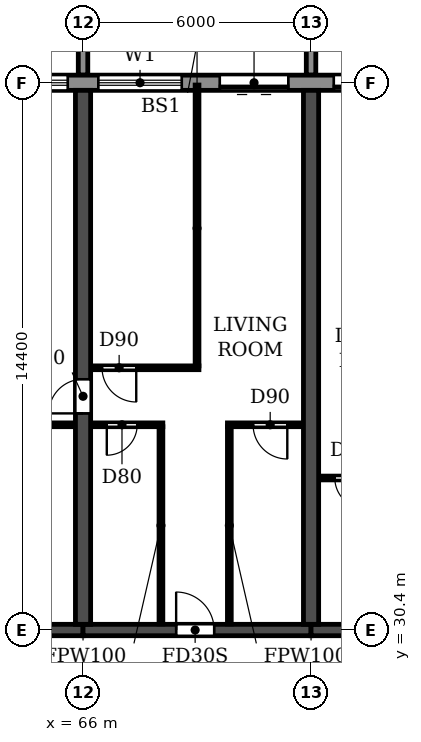
"""IFC4 building model, lengths in metres.
Left out: names, types, materials, properties, quantities, classifications, styles, units other than length and angle.
Written with IfcOpenShell. Run it as: python <this file> out.ifc"""

import sys

from ifc_helpers import new_model, si_unit, direction, frame, frame_2d, origin, place, context, subcontext, project, spatial, polyline, rectangle, outline, extrude, source, transform, mapped, element, fill, save


model = new_model("IFC4")
c1 = context("Model", 3, precision=1e-05, world=origin(), true_north=direction((0.0, 1.0)))
c2 = subcontext(c1, "Body", "Model", "MODEL_VIEW")
j1 = project(units=[si_unit("LENGTHUNIT", "METRE"), si_unit("PLANEANGLEUNIT", "RADIAN")], contexts=[c1])
p1 = place(None, origin())
s1 = spatial("IfcSite", under=j1, at=p1, CompositionType="ELEMENT")
p2 = place(p1, origin())
s2 = spatial("IfcBuilding", under=s1, at=p2, CompositionType="ELEMENT")
p3 = place(p2, frame((0.0, 0.0, 49.8)))
s3 = spatial("IfcBuildingStorey", under=s2, at=p3, CompositionType="ELEMENT", Elevation=49.8)
p4 = place(p3, frame((66.0, 30.55, 0.0), z_axis=(0.0, 0.0, 1.0), x_axis=(0.0, 1.0, 0.0)))
e1 = element("IfcWall", 1, at=p4, inside=s3, PredefinedType="SHEAR", context=c2, shape_type="SweptSolid", body=[
    extrude(rectangle(XDim=14.05, YDim=0.4, at=frame_2d((7.025, 0.0))), origin(), (0.0, 0.0, 1.0), 3.0),
])
p5 = place(p4, frame((5.55, 0.0, 0.0)))
e2 = element("IfcOpeningElement", 2, at=p5, cuts=e1, PredefinedType="OPENING", context=c2, shape_type="SweptSolid", body=[
    extrude(rectangle(XDim=0.9, YDim=2.1, at=frame_2d((0.45, 1.05))), frame((0.0, 0.21, 0.0), z_axis=(0.0, -1.0, 0.0), x_axis=(1.0, 0.0, 0.0)), (0.0, 0.0, 1.0), 0.42),
])
p6 = place(p3, frame((72.0, 30.55, 0.0), z_axis=(0.0, 0.0, 1.0), x_axis=(0.0, 1.0, 0.0)))
e3 = element("IfcWall", 3, at=p6, inside=s3, PredefinedType="SHEAR", context=c2, shape_type="SweptSolid", body=[
    extrude(rectangle(XDim=14.05, YDim=0.4, at=frame_2d((7.025, 0.0))), origin(), (0.0, 0.0, 1.0), 3.0),
])
p7 = place(p3, frame((60.0, 30.4, 0.0), z_axis=(0.0, 0.0, 1.0), x_axis=(1.0, 0.0, 0.0)))
e4 = element("IfcWall", 4, at=p7, inside=s3, PredefinedType="SHEAR", context=c2, shape_type="SweptSolid", body=[
    extrude(rectangle(XDim=6.0, YDim=0.3, at=frame_2d((3.0, 0.0))), origin(), (0.0, 0.0, 1.0), 2.4),
])
p8 = place(p3, frame((66.0, 30.4, 0.0), z_axis=(0.0, 0.0, 1.0), x_axis=(1.0, 0.0, 0.0)))
e5 = element("IfcWall", 5, at=p8, inside=s3, PredefinedType="SHEAR", context=c2, shape_type="SweptSolid", body=[
    extrude(rectangle(XDim=6.0, YDim=0.3, at=frame_2d((3.0, 0.0))), origin(), (0.0, 0.0, 1.0), 2.4),
])
p9 = place(p8, frame((2.45, 0.0, 0.0)))
e6 = element("IfcOpeningElement", 6, at=p9, cuts=e5, PredefinedType="OPENING", context=c2, shape_type="SweptSolid", body=[
    extrude(rectangle(XDim=1.0, YDim=2.1, at=frame_2d((0.5, 1.05))), frame((0.0, 0.16, 0.0), z_axis=(0.0, -1.0, 0.0), x_axis=(1.0, 0.0, 0.0)), (0.0, 0.0, 1.0), 0.32),
])
p10 = place(p3, frame((72.0, 30.4, 0.0), z_axis=(0.0, 0.0, 1.0), x_axis=(1.0, 0.0, 0.0)))
e7 = element("IfcWall", 7, at=p10, inside=s3, PredefinedType="SHEAR", context=c2, shape_type="SweptSolid", body=[
    extrude(rectangle(XDim=6.0, YDim=0.3, at=frame_2d((3.0, 0.0))), origin(), (0.0, 0.0, 1.0), 2.4),
])
p11 = place(p10, frame((2.45, 0.0, 0.0)))
e8 = element("IfcOpeningElement", 8, at=p11, cuts=e7, PredefinedType="OPENING", context=c2, shape_type="SweptSolid", body=[
    extrude(rectangle(XDim=1.0, YDim=2.1, at=frame_2d((0.5, 1.05))), frame((0.0, 0.16, 0.0), z_axis=(0.0, -1.0, 0.0), x_axis=(1.0, 0.0, 0.0)), (0.0, 0.0, 1.0), 0.32),
])
p12 = place(p3, frame((97.317, 44.8, 0.0), z_axis=(0.0, 0.0, 1.0), x_axis=(-1.0, 0.0, 0.0)))
e9 = element("IfcWall", 9, at=p12, inside=s3, PredefinedType="STANDARD", context=c2, shape_type="SweptSolid", body=[
    extrude(rectangle(XDim=92.634, YDim=0.4, at=frame_2d((46.317, 0.0))), origin(), (0.0, 0.0, 1.0), 3.0),
])
p13 = place(p12, frame((88.917, 0.0, 0.0)))
e10 = element("IfcOpeningElement", 10, at=p13, cuts=e9, PredefinedType="OPENING", context=c2, shape_type="SweptSolid", body=[
    extrude(rectangle(XDim=1.8, YDim=2.4, at=frame_2d((0.9, 1.2))), frame((0.0, 0.21, 0.0), z_axis=(0.0, -1.0, 0.0), x_axis=(1.0, 0.0, 0.0)), (0.0, 0.0, 1.0), 0.42),
])
p14 = place(p12, frame((85.717, 0.0, 0.9)))
e11 = element("IfcOpeningElement", 11, at=p14, cuts=e9, PredefinedType="OPENING", context=c2, shape_type="SweptSolid", body=[
    extrude(rectangle(XDim=2.2, YDim=1.5, at=frame_2d((1.1, 0.75))), frame((0.0, 0.21, 0.0), z_axis=(0.0, -1.0, 0.0), x_axis=(1.0, 0.0, 0.0)), (0.0, 0.0, 1.0), 0.42),
])
p15 = place(p12, frame((82.717, 0.0, 0.9)))
e12 = element("IfcOpeningElement", 12, at=p15, cuts=e9, PredefinedType="OPENING", context=c2, shape_type="SweptSolid", body=[
    extrude(rectangle(XDim=2.2, YDim=1.5, at=frame_2d((1.1, 0.75))), frame((0.0, 0.21, 0.0), z_axis=(0.0, -1.0, 0.0), x_axis=(1.0, 0.0, 0.0)), (0.0, 0.0, 1.0), 0.42),
])
p16 = place(p12, frame((79.717, 0.0, 0.9)))
e13 = element("IfcOpeningElement", 13, at=p16, cuts=e9, PredefinedType="OPENING", context=c2, shape_type="SweptSolid", body=[
    extrude(rectangle(XDim=2.2, YDim=1.5, at=frame_2d((1.1, 0.75))), frame((0.0, 0.21, 0.0), z_axis=(0.0, -1.0, 0.0), x_axis=(1.0, 0.0, 0.0)), (0.0, 0.0, 1.0), 0.42),
])
p17 = place(p12, frame((76.717, 0.0, 0.9)))
e14 = element("IfcOpeningElement", 14, at=p17, cuts=e9, PredefinedType="OPENING", context=c2, shape_type="SweptSolid", body=[
    extrude(rectangle(XDim=2.2, YDim=1.5, at=frame_2d((1.1, 0.75))), frame((0.0, 0.21, 0.0), z_axis=(0.0, -1.0, 0.0), x_axis=(1.0, 0.0, 0.0)), (0.0, 0.0, 1.0), 0.42),
])
p18 = place(p12, frame((73.917, 0.0, 0.0)))
e15 = element("IfcOpeningElement", 15, at=p18, cuts=e9, PredefinedType="OPENING", context=c2, shape_type="SweptSolid", body=[
    extrude(rectangle(XDim=1.8, YDim=2.4, at=frame_2d((0.9, 1.2))), frame((0.0, 0.21, 0.0), z_axis=(0.0, -1.0, 0.0), x_axis=(1.0, 0.0, 0.0)), (0.0, 0.0, 1.0), 0.42),
])
p19 = place(p12, frame((70.717, 0.0, 0.9)))
e16 = element("IfcOpeningElement", 16, at=p19, cuts=e9, PredefinedType="OPENING", context=c2, shape_type="SweptSolid", body=[
    extrude(rectangle(XDim=2.2, YDim=1.5, at=frame_2d((1.1, 0.75))), frame((0.0, 0.21, 0.0), z_axis=(0.0, -1.0, 0.0), x_axis=(1.0, 0.0, 0.0)), (0.0, 0.0, 1.0), 0.42),
])
p20 = place(p12, frame((67.717, 0.0, 0.9)))
e17 = element("IfcOpeningElement", 17, at=p20, cuts=e9, PredefinedType="OPENING", context=c2, shape_type="SweptSolid", body=[
    extrude(rectangle(XDim=2.2, YDim=1.5, at=frame_2d((1.1, 0.75))), frame((0.0, 0.21, 0.0), z_axis=(0.0, -1.0, 0.0), x_axis=(1.0, 0.0, 0.0)), (0.0, 0.0, 1.0), 0.42),
])
p21 = place(p12, frame((64.717, 0.0, 0.9)))
e18 = element("IfcOpeningElement", 18, at=p21, cuts=e9, PredefinedType="OPENING", context=c2, shape_type="SweptSolid", body=[
    extrude(rectangle(XDim=2.2, YDim=1.5, at=frame_2d((1.1, 0.75))), frame((0.0, 0.21, 0.0), z_axis=(0.0, -1.0, 0.0), x_axis=(1.0, 0.0, 0.0)), (0.0, 0.0, 1.0), 0.42),
])
p22 = place(p12, frame((61.917, 0.0, 0.0)))
e19 = element("IfcOpeningElement", 19, at=p22, cuts=e9, PredefinedType="OPENING", context=c2, shape_type="SweptSolid", body=[
    extrude(rectangle(XDim=1.8, YDim=2.4, at=frame_2d((0.9, 1.2))), frame((0.0, 0.21, 0.0), z_axis=(0.0, -1.0, 0.0), x_axis=(1.0, 0.0, 0.0)), (0.0, 0.0, 1.0), 0.42),
])
p23 = place(p12, frame((58.717, 0.0, 0.9)))
e20 = element("IfcOpeningElement", 20, at=p23, cuts=e9, PredefinedType="OPENING", context=c2, shape_type="SweptSolid", body=[
    extrude(rectangle(XDim=2.2, YDim=1.5, at=frame_2d((1.1, 0.75))), frame((0.0, 0.21, 0.0), z_axis=(0.0, -1.0, 0.0), x_axis=(1.0, 0.0, 0.0)), (0.0, 0.0, 1.0), 0.42),
])
p24 = place(p12, frame((55.717, 0.0, 0.9)))
e21 = element("IfcOpeningElement", 21, at=p24, cuts=e9, PredefinedType="OPENING", context=c2, shape_type="SweptSolid", body=[
    extrude(rectangle(XDim=2.2, YDim=1.5, at=frame_2d((1.1, 0.75))), frame((0.0, 0.21, 0.0), z_axis=(0.0, -1.0, 0.0), x_axis=(1.0, 0.0, 0.0)), (0.0, 0.0, 1.0), 0.42),
])
p25 = place(p12, frame((52.717, 0.0, 0.9)))
e22 = element("IfcOpeningElement", 22, at=p25, cuts=e9, PredefinedType="OPENING", context=c2, shape_type="SweptSolid", body=[
    extrude(rectangle(XDim=2.2, YDim=1.5, at=frame_2d((1.1, 0.75))), frame((0.0, 0.21, 0.0), z_axis=(0.0, -1.0, 0.0), x_axis=(1.0, 0.0, 0.0)), (0.0, 0.0, 1.0), 0.42),
])
p26 = place(p12, frame((49.917, 0.0, 0.0)))
e23 = element("IfcOpeningElement", 23, at=p26, cuts=e9, PredefinedType="OPENING", context=c2, shape_type="SweptSolid", body=[
    extrude(rectangle(XDim=1.8, YDim=2.4, at=frame_2d((0.9, 1.2))), frame((0.0, 0.21, 0.0), z_axis=(0.0, -1.0, 0.0), x_axis=(1.0, 0.0, 0.0)), (0.0, 0.0, 1.0), 0.42),
])
p27 = place(p12, frame((46.717, 0.0, 0.9)))
e24 = element("IfcOpeningElement", 24, at=p27, cuts=e9, PredefinedType="OPENING", context=c2, shape_type="SweptSolid", body=[
    extrude(rectangle(XDim=2.2, YDim=1.5, at=frame_2d((1.1, 0.75))), frame((0.0, 0.21, 0.0), z_axis=(0.0, -1.0, 0.0), x_axis=(1.0, 0.0, 0.0)), (0.0, 0.0, 1.0), 0.42),
])
p28 = place(p12, frame((43.717, 0.0, 0.9)))
e25 = element("IfcOpeningElement", 25, at=p28, cuts=e9, PredefinedType="OPENING", context=c2, shape_type="SweptSolid", body=[
    extrude(rectangle(XDim=2.2, YDim=1.5, at=frame_2d((1.1, 0.75))), frame((0.0, 0.21, 0.0), z_axis=(0.0, -1.0, 0.0), x_axis=(1.0, 0.0, 0.0)), (0.0, 0.0, 1.0), 0.42),
])
p29 = place(p12, frame((40.717, 0.0, 0.9)))
e26 = element("IfcOpeningElement", 26, at=p29, cuts=e9, PredefinedType="OPENING", context=c2, shape_type="SweptSolid", body=[
    extrude(rectangle(XDim=2.2, YDim=1.5, at=frame_2d((1.1, 0.75))), frame((0.0, 0.21, 0.0), z_axis=(0.0, -1.0, 0.0), x_axis=(1.0, 0.0, 0.0)), (0.0, 0.0, 1.0), 0.42),
])
p30 = place(p12, frame((37.917, 0.0, 0.0)))
e27 = element("IfcOpeningElement", 27, at=p30, cuts=e9, PredefinedType="OPENING", context=c2, shape_type="SweptSolid", body=[
    extrude(rectangle(XDim=1.8, YDim=2.4, at=frame_2d((0.9, 1.2))), frame((0.0, 0.21, 0.0), z_axis=(0.0, -1.0, 0.0), x_axis=(1.0, 0.0, 0.0)), (0.0, 0.0, 1.0), 0.42),
])
p31 = place(p12, frame((34.717, 0.0, 0.9)))
e28 = element("IfcOpeningElement", 28, at=p31, cuts=e9, PredefinedType="OPENING", context=c2, shape_type="SweptSolid", body=[
    extrude(rectangle(XDim=2.2, YDim=1.5, at=frame_2d((1.1, 0.75))), frame((0.0, 0.21, 0.0), z_axis=(0.0, -1.0, 0.0), x_axis=(1.0, 0.0, 0.0)), (0.0, 0.0, 1.0), 0.42),
])
p32 = place(p12, frame((31.717, 0.0, 0.9)))
e29 = element("IfcOpeningElement", 29, at=p32, cuts=e9, PredefinedType="OPENING", context=c2, shape_type="SweptSolid", body=[
    extrude(rectangle(XDim=2.2, YDim=1.5, at=frame_2d((1.1, 0.75))), frame((0.0, 0.21, 0.0), z_axis=(0.0, -1.0, 0.0), x_axis=(1.0, 0.0, 0.0)), (0.0, 0.0, 1.0), 0.42),
])
p33 = place(p12, frame((28.717, 0.0, 0.9)))
e30 = element("IfcOpeningElement", 30, at=p33, cuts=e9, PredefinedType="OPENING", context=c2, shape_type="SweptSolid", body=[
    extrude(rectangle(XDim=2.2, YDim=1.5, at=frame_2d((1.1, 0.75))), frame((0.0, 0.21, 0.0), z_axis=(0.0, -1.0, 0.0), x_axis=(1.0, 0.0, 0.0)), (0.0, 0.0, 1.0), 0.42),
])
p34 = place(p12, frame((25.917, 0.0, 0.0)))
e31 = element("IfcOpeningElement", 31, at=p34, cuts=e9, PredefinedType="OPENING", context=c2, shape_type="SweptSolid", body=[
    extrude(rectangle(XDim=1.8, YDim=2.4, at=frame_2d((0.9, 1.2))), frame((0.0, 0.21, 0.0), z_axis=(0.0, -1.0, 0.0), x_axis=(1.0, 0.0, 0.0)), (0.0, 0.0, 1.0), 0.42),
])
p35 = place(p12, frame((22.917, 0.0, 0.0)))
e32 = element("IfcOpeningElement", 32, at=p35, cuts=e9, PredefinedType="OPENING", context=c2, shape_type="SweptSolid", body=[
    extrude(rectangle(XDim=1.8, YDim=2.4, at=frame_2d((0.9, 1.2))), frame((0.0, 0.21, 0.0), z_axis=(0.0, -1.0, 0.0), x_axis=(1.0, 0.0, 0.0)), (0.0, 0.0, 1.0), 0.42),
])
p36 = place(p12, frame((19.717, 0.0, 0.9)))
e33 = element("IfcOpeningElement", 33, at=p36, cuts=e9, PredefinedType="OPENING", context=c2, shape_type="SweptSolid", body=[
    extrude(rectangle(XDim=2.2, YDim=1.5, at=frame_2d((1.1, 0.75))), frame((0.0, 0.21, 0.0), z_axis=(0.0, -1.0, 0.0), x_axis=(1.0, 0.0, 0.0)), (0.0, 0.0, 1.0), 0.42),
])
p37 = place(p12, frame((16.717, 0.0, 0.9)))
e34 = element("IfcOpeningElement", 34, at=p37, cuts=e9, PredefinedType="OPENING", context=c2, shape_type="SweptSolid", body=[
    extrude(rectangle(XDim=2.2, YDim=1.5, at=frame_2d((1.1, 0.75))), frame((0.0, 0.21, 0.0), z_axis=(0.0, -1.0, 0.0), x_axis=(1.0, 0.0, 0.0)), (0.0, 0.0, 1.0), 0.42),
])
p38 = place(p12, frame((13.717, 0.0, 0.9)))
e35 = element("IfcOpeningElement", 35, at=p38, cuts=e9, PredefinedType="OPENING", context=c2, shape_type="SweptSolid", body=[
    extrude(rectangle(XDim=2.2, YDim=1.5, at=frame_2d((1.1, 0.75))), frame((0.0, 0.21, 0.0), z_axis=(0.0, -1.0, 0.0), x_axis=(1.0, 0.0, 0.0)), (0.0, 0.0, 1.0), 0.42),
])
p39 = place(p12, frame((10.717, 0.0, 0.9)))
e36 = element("IfcOpeningElement", 36, at=p39, cuts=e9, PredefinedType="OPENING", context=c2, shape_type="SweptSolid", body=[
    extrude(rectangle(XDim=2.2, YDim=1.5, at=frame_2d((1.1, 0.75))), frame((0.0, 0.21, 0.0), z_axis=(0.0, -1.0, 0.0), x_axis=(1.0, 0.0, 0.0)), (0.0, 0.0, 1.0), 0.42),
])
p40 = place(p12, frame((7.917, 0.0, 0.0)))
e37 = element("IfcOpeningElement", 37, at=p40, cuts=e9, PredefinedType="OPENING", context=c2, shape_type="SweptSolid", body=[
    extrude(rectangle(XDim=1.8, YDim=2.4, at=frame_2d((0.9, 1.2))), frame((0.0, 0.21, 0.0), z_axis=(0.0, -1.0, 0.0), x_axis=(1.0, 0.0, 0.0)), (0.0, 0.0, 1.0), 0.42),
])
p41 = place(p12, frame((4.717, 0.0, 0.9)))
e38 = element("IfcOpeningElement", 38, at=p41, cuts=e9, PredefinedType="OPENING", context=c2, shape_type="SweptSolid", body=[
    extrude(rectangle(XDim=2.2, YDim=1.5, at=frame_2d((1.1, 0.75))), frame((0.0, 0.21, 0.0), z_axis=(0.0, -1.0, 0.0), x_axis=(1.0, 0.0, 0.0)), (0.0, 0.0, 1.0), 0.42),
])
p42 = place(p12, frame((1.917, 0.0, 0.0)))
e39 = element("IfcOpeningElement", 39, at=p42, cuts=e9, PredefinedType="OPENING", context=c2, shape_type="SweptSolid", body=[
    extrude(rectangle(XDim=1.8, YDim=2.4, at=frame_2d((0.9, 1.2))), frame((0.0, 0.21, 0.0), z_axis=(0.0, -1.0, 0.0), x_axis=(1.0, 0.0, 0.0)), (0.0, 0.0, 1.0), 0.42),
])
m1 = source(origin(), c2, "Body", "SweptSolid", [
    extrude(outline(polyline([(0.0, 0.0), (0.25, 0.0), (0.25, 3.1), (0.0, 3.1), (0.0, 0.0)])), origin(), (0.0, 0.0, 1.0), 3.1),
])
for number, where in (
    (40, (65.875, 45.0, 0.0)),
    (41, (71.875, 45.0, 0.0)),
):
    element("IfcWall", number, at=place(p3, frame(where)), inside=s3, PredefinedType="STANDARD", context=c2, shape_type="MappedRepresentation", body=[
        mapped(m1, transform((0.0, 0.0, 0.0))),
    ])
p43 = place(p3, frame((72.21, 34.4, 0.0), z_axis=(0.0, 0.0, 1.0), x_axis=(1.0, 0.0, 0.0)))
e42 = element("IfcWall", 42, at=p43, inside=s3, PredefinedType="PARTITIONING", context=c2, shape_type="SweptSolid", body=[
    extrude(rectangle(XDim=1.89, YDim=0.1, at=frame_2d((0.945, 0.0))), origin(), (0.0, 0.0, 1.0), 3.0),
])
p44 = place(p43, frame((0.415, 0.0, 0.0)))
e43 = element("IfcOpeningElement", 43, at=p44, cuts=e42, PredefinedType="OPENING", context=c2, shape_type="SweptSolid", body=[
    extrude(rectangle(XDim=0.8, YDim=2.1, at=frame_2d((0.4, 1.05))), frame((0.0, 0.06, 0.0), z_axis=(0.0, -1.0, 0.0), x_axis=(1.0, 0.0, 0.0)), (0.0, 0.0, 1.0), 0.12),
])
p45 = place(p3, frame((62.9, 35.8, 0.0), z_axis=(0.0, 0.0, 1.0), x_axis=(1.0, 0.0, 0.0)))
e44 = element("IfcWall", 44, at=p45, inside=s3, PredefinedType="PARTITIONING", context=c2, shape_type="SweptSolid", body=[
    extrude(rectangle(XDim=2.89, YDim=0.1, at=frame_2d((1.445, 0.0))), origin(), (0.0, 0.0, 1.0), 3.0),
])
p46 = place(p45, frame((1.2, 0.0, 0.0)))
e45 = element("IfcOpeningElement", 45, at=p46, cuts=e44, PredefinedType="OPENING", context=c2, shape_type="SweptSolid", body=[
    extrude(rectangle(XDim=0.8, YDim=2.1, at=frame_2d((0.4, 1.05))), frame((0.0, 0.06, 0.0), z_axis=(0.0, -1.0, 0.0), x_axis=(1.0, 0.0, 0.0)), (0.0, 0.0, 1.0), 0.12),
])
p47 = place(p3, frame((66.21, 35.8, 0.0), z_axis=(0.0, 0.0, 1.0), x_axis=(1.0, 0.0, 0.0)))
e46 = element("IfcWall", 46, at=p47, inside=s3, PredefinedType="PARTITIONING", context=c2, shape_type="SweptSolid", body=[
    extrude(rectangle(XDim=1.89, YDim=0.1, at=frame_2d((0.945, 0.0))), origin(), (0.0, 0.0, 1.0), 3.0),
])
p48 = place(p47, frame((0.415, 0.0, 0.0)))
e47 = element("IfcOpeningElement", 47, at=p48, cuts=e46, PredefinedType="OPENING", context=c2, shape_type="SweptSolid", body=[
    extrude(rectangle(XDim=0.8, YDim=2.1, at=frame_2d((0.4, 1.05))), frame((0.0, 0.06, 0.0), z_axis=(0.0, -1.0, 0.0), x_axis=(1.0, 0.0, 0.0)), (0.0, 0.0, 1.0), 0.12),
])
p49 = place(p3, frame((69.8, 35.8, 0.0), z_axis=(0.0, 0.0, 1.0), x_axis=(1.0, 0.0, 0.0)))
e48 = element("IfcWall", 48, at=p49, inside=s3, PredefinedType="PARTITIONING", context=c2, shape_type="SweptSolid", body=[
    extrude(rectangle(XDim=1.99, YDim=0.1, at=frame_2d((0.995, 0.0))), origin(), (0.0, 0.0, 1.0), 3.0),
])
p50 = place(p49, frame((0.675, 0.0, 0.0)))
e49 = element("IfcOpeningElement", 49, at=p50, cuts=e48, PredefinedType="OPENING", context=c2, shape_type="SweptSolid", body=[
    extrude(rectangle(XDim=0.9, YDim=2.1, at=frame_2d((0.45, 1.05))), frame((0.0, 0.06, 0.0), z_axis=(0.0, -1.0, 0.0), x_axis=(1.0, 0.0, 0.0)), (0.0, 0.0, 1.0), 0.12),
])
p51 = place(p3, frame((66.21, 37.3, 0.0), z_axis=(0.0, 0.0, 1.0), x_axis=(1.0, 0.0, 0.0)))
e50 = element("IfcWall", 50, at=p51, inside=s3, PredefinedType="PARTITIONING", context=c2, shape_type="SweptSolid", body=[
    extrude(rectangle(XDim=2.84, YDim=0.1, at=frame_2d((1.42, 0.0))), origin(), (0.0, 0.0, 1.0), 3.0),
])
p52 = place(p51, frame((0.29, 0.0, 0.0)))
e51 = element("IfcOpeningElement", 51, at=p52, cuts=e50, PredefinedType="OPENING", context=c2, shape_type="SweptSolid", body=[
    extrude(rectangle(XDim=0.9, YDim=2.1, at=frame_2d((0.45, 1.05))), frame((0.0, 0.06, 0.0), z_axis=(0.0, -1.0, 0.0), x_axis=(1.0, 0.0, 0.0)), (0.0, 0.0, 1.0), 0.12),
])
p53 = place(p3, frame((68.05, 30.56, 0.0), z_axis=(0.0, 0.0, 1.0), x_axis=(0.0, 1.0, 0.0)))
e52 = element("IfcWall", 52, at=p53, inside=s3, PredefinedType="PARTITIONING", context=c2, shape_type="SweptSolid", body=[
    extrude(rectangle(XDim=5.19, YDim=0.1, at=frame_2d((2.595, 0.0))), origin(), (0.0, 0.0, 1.0), 3.0),
])
p54 = place(p3, frame((69.0, 37.35, 0.0), z_axis=(0.0, 0.0, 1.0), x_axis=(0.0, 1.0, 0.0)))
e53 = element("IfcWall", 53, at=p54, inside=s3, PredefinedType="PARTITIONING", context=c2, shape_type="SweptSolid", body=[
    extrude(rectangle(XDim=7.39, YDim=0.1, at=frame_2d((3.695, 0.0))), origin(), (0.0, 0.0, 1.0), 3.0),
])
p55 = place(p3, frame((69.85, 30.56, 0.0), z_axis=(0.0, 0.0, 1.0), x_axis=(0.0, 1.0, 0.0)))
e54 = element("IfcWall", 54, at=p55, inside=s3, PredefinedType="PARTITIONING", context=c2, shape_type="SweptSolid", body=[
    extrude(rectangle(XDim=5.19, YDim=0.1, at=frame_2d((2.595, 0.0))), origin(), (0.0, 0.0, 1.0), 3.0),
])
p56 = place(p32, origin())
e55 = element("IfcWindow", 55, at=p56, inside=s3, PartitioningType="DOUBLE_PANEL_HORIZONTAL", PredefinedType="WINDOW", context=c2, shape_type="SweptSolid", body=[
    extrude(rectangle(XDim=2.2, YDim=1.5, at=frame_2d((1.1, 0.75))), frame((0.0, 0.03, 0.0), z_axis=(0.0, -1.0, 0.0), x_axis=(1.0, 0.0, 0.0)), (0.0, 0.0, 1.0), 0.06),
])
fill(e29, e55)
p57 = place(p33, origin())
e56 = element("IfcWindow", 56, at=p57, inside=s3, PartitioningType="DOUBLE_PANEL_HORIZONTAL", PredefinedType="WINDOW", context=c2, shape_type="SweptSolid", body=[
    extrude(rectangle(XDim=2.2, YDim=1.5, at=frame_2d((1.1, 0.75))), frame((0.0, 0.03, 0.0), z_axis=(0.0, -1.0, 0.0), x_axis=(1.0, 0.0, 0.0)), (0.0, 0.0, 1.0), 0.06),
])
fill(e30, e56)
p58 = place(p34, origin())
e57 = element("IfcDoor", 57, at=p58, inside=s3, OperationType="DOUBLE_DOOR_SLIDING", PredefinedType="DOOR", context=c2, shape_type="SweptSolid", body=[
    extrude(rectangle(XDim=1.8, YDim=2.4, at=frame_2d((0.9, 1.2))), frame((0.0, 0.025, 0.0), z_axis=(0.0, -1.0, 0.0), x_axis=(1.0, 0.0, 0.0)), (0.0, 0.0, 1.0), 0.05),
])
fill(e31, e57)
p59 = place(p35, origin())
e58 = element("IfcDoor", 58, at=p59, inside=s3, OperationType="DOUBLE_DOOR_SLIDING", PredefinedType="DOOR", context=c2, shape_type="SweptSolid", body=[
    extrude(rectangle(XDim=1.8, YDim=2.4, at=frame_2d((0.9, 1.2))), frame((0.0, 0.025, 0.0), z_axis=(0.0, -1.0, 0.0), x_axis=(1.0, 0.0, 0.0)), (0.0, 0.0, 1.0), 0.05),
])
fill(e32, e58)
p60 = place(p5, origin())
e59 = element("IfcDoor", 59, at=p60, inside=s3, OperationType="SINGLE_SWING_LEFT", PredefinedType="DOOR", context=c2, shape_type="SweptSolid", body=[
    extrude(rectangle(XDim=0.9, YDim=2.1, at=frame_2d((0.45, 1.05))), frame((0.0, 0.025, 0.0), z_axis=(0.0, -1.0, 0.0), x_axis=(1.0, 0.0, 0.0)), (0.0, 0.0, 1.0), 0.05),
])
fill(e2, e59)
p61 = place(p52, frame((0.9, 0.0, 0.0), z_axis=(0.0, 0.0, 1.0), x_axis=(-1.0, 0.0, 0.0)))
e60 = element("IfcDoor", 60, at=p61, inside=s3, OperationType="SINGLE_SWING_LEFT", PredefinedType="DOOR", context=c2, shape_type="SweptSolid", body=[
    extrude(rectangle(XDim=0.9, YDim=2.1, at=frame_2d((0.45, 1.05))), frame((0.0, 0.025, 0.0), z_axis=(0.0, -1.0, 0.0), x_axis=(1.0, 0.0, 0.0)), (0.0, 0.0, 1.0), 0.05),
])
fill(e51, e60)
p62 = place(p48, frame((0.8, 0.0, 0.0), z_axis=(0.0, 0.0, 1.0), x_axis=(-1.0, 0.0, 0.0)))
e61 = element("IfcDoor", 61, at=p62, inside=s3, OperationType="SINGLE_SWING_RIGHT", PredefinedType="DOOR", context=c2, shape_type="SweptSolid", body=[
    extrude(rectangle(XDim=0.8, YDim=2.1, at=frame_2d((0.4, 1.05))), frame((0.0, 0.025, 0.0), z_axis=(0.0, -1.0, 0.0), x_axis=(1.0, 0.0, 0.0)), (0.0, 0.0, 1.0), 0.05),
])
fill(e47, e61)
p63 = place(p9, origin())
e62 = element("IfcDoor", 62, at=p63, inside=s3, OperationType="SINGLE_SWING_LEFT", PredefinedType="DOOR", context=c2, shape_type="SweptSolid", body=[
    extrude(rectangle(XDim=1.0, YDim=2.1, at=frame_2d((0.5, 1.05))), frame((0.0, 0.025, 0.0), z_axis=(0.0, -1.0, 0.0), x_axis=(1.0, 0.0, 0.0)), (0.0, 0.0, 1.0), 0.05),
])
fill(e6, e62)
p64 = place(p50, frame((0.9, 0.0, 0.0), z_axis=(0.0, 0.0, 1.0), x_axis=(-1.0, 0.0, 0.0)))
e63 = element("IfcDoor", 63, at=p64, inside=s3, OperationType="SINGLE_SWING_LEFT", PredefinedType="DOOR", context=c2, shape_type="SweptSolid", body=[
    extrude(rectangle(XDim=0.9, YDim=2.1, at=frame_2d((0.45, 1.05))), frame((0.0, 0.025, 0.0), z_axis=(0.0, -1.0, 0.0), x_axis=(1.0, 0.0, 0.0)), (0.0, 0.0, 1.0), 0.05),
])
fill(e49, e63)
p65 = place(p44, frame((0.8, 0.0, 0.0), z_axis=(0.0, 0.0, 1.0), x_axis=(-1.0, 0.0, 0.0)))
e64 = element("IfcDoor", 64, at=p65, inside=s3, OperationType="SINGLE_SWING_LEFT", PredefinedType="DOOR", context=c2, shape_type="SweptSolid", body=[
    extrude(rectangle(XDim=0.8, YDim=2.1, at=frame_2d((0.4, 1.05))), frame((0.0, 0.025, 0.0), z_axis=(0.0, -1.0, 0.0), x_axis=(1.0, 0.0, 0.0)), (0.0, 0.0, 1.0), 0.05),
])
fill(e43, e64)
save(model, sys.argv[1])
